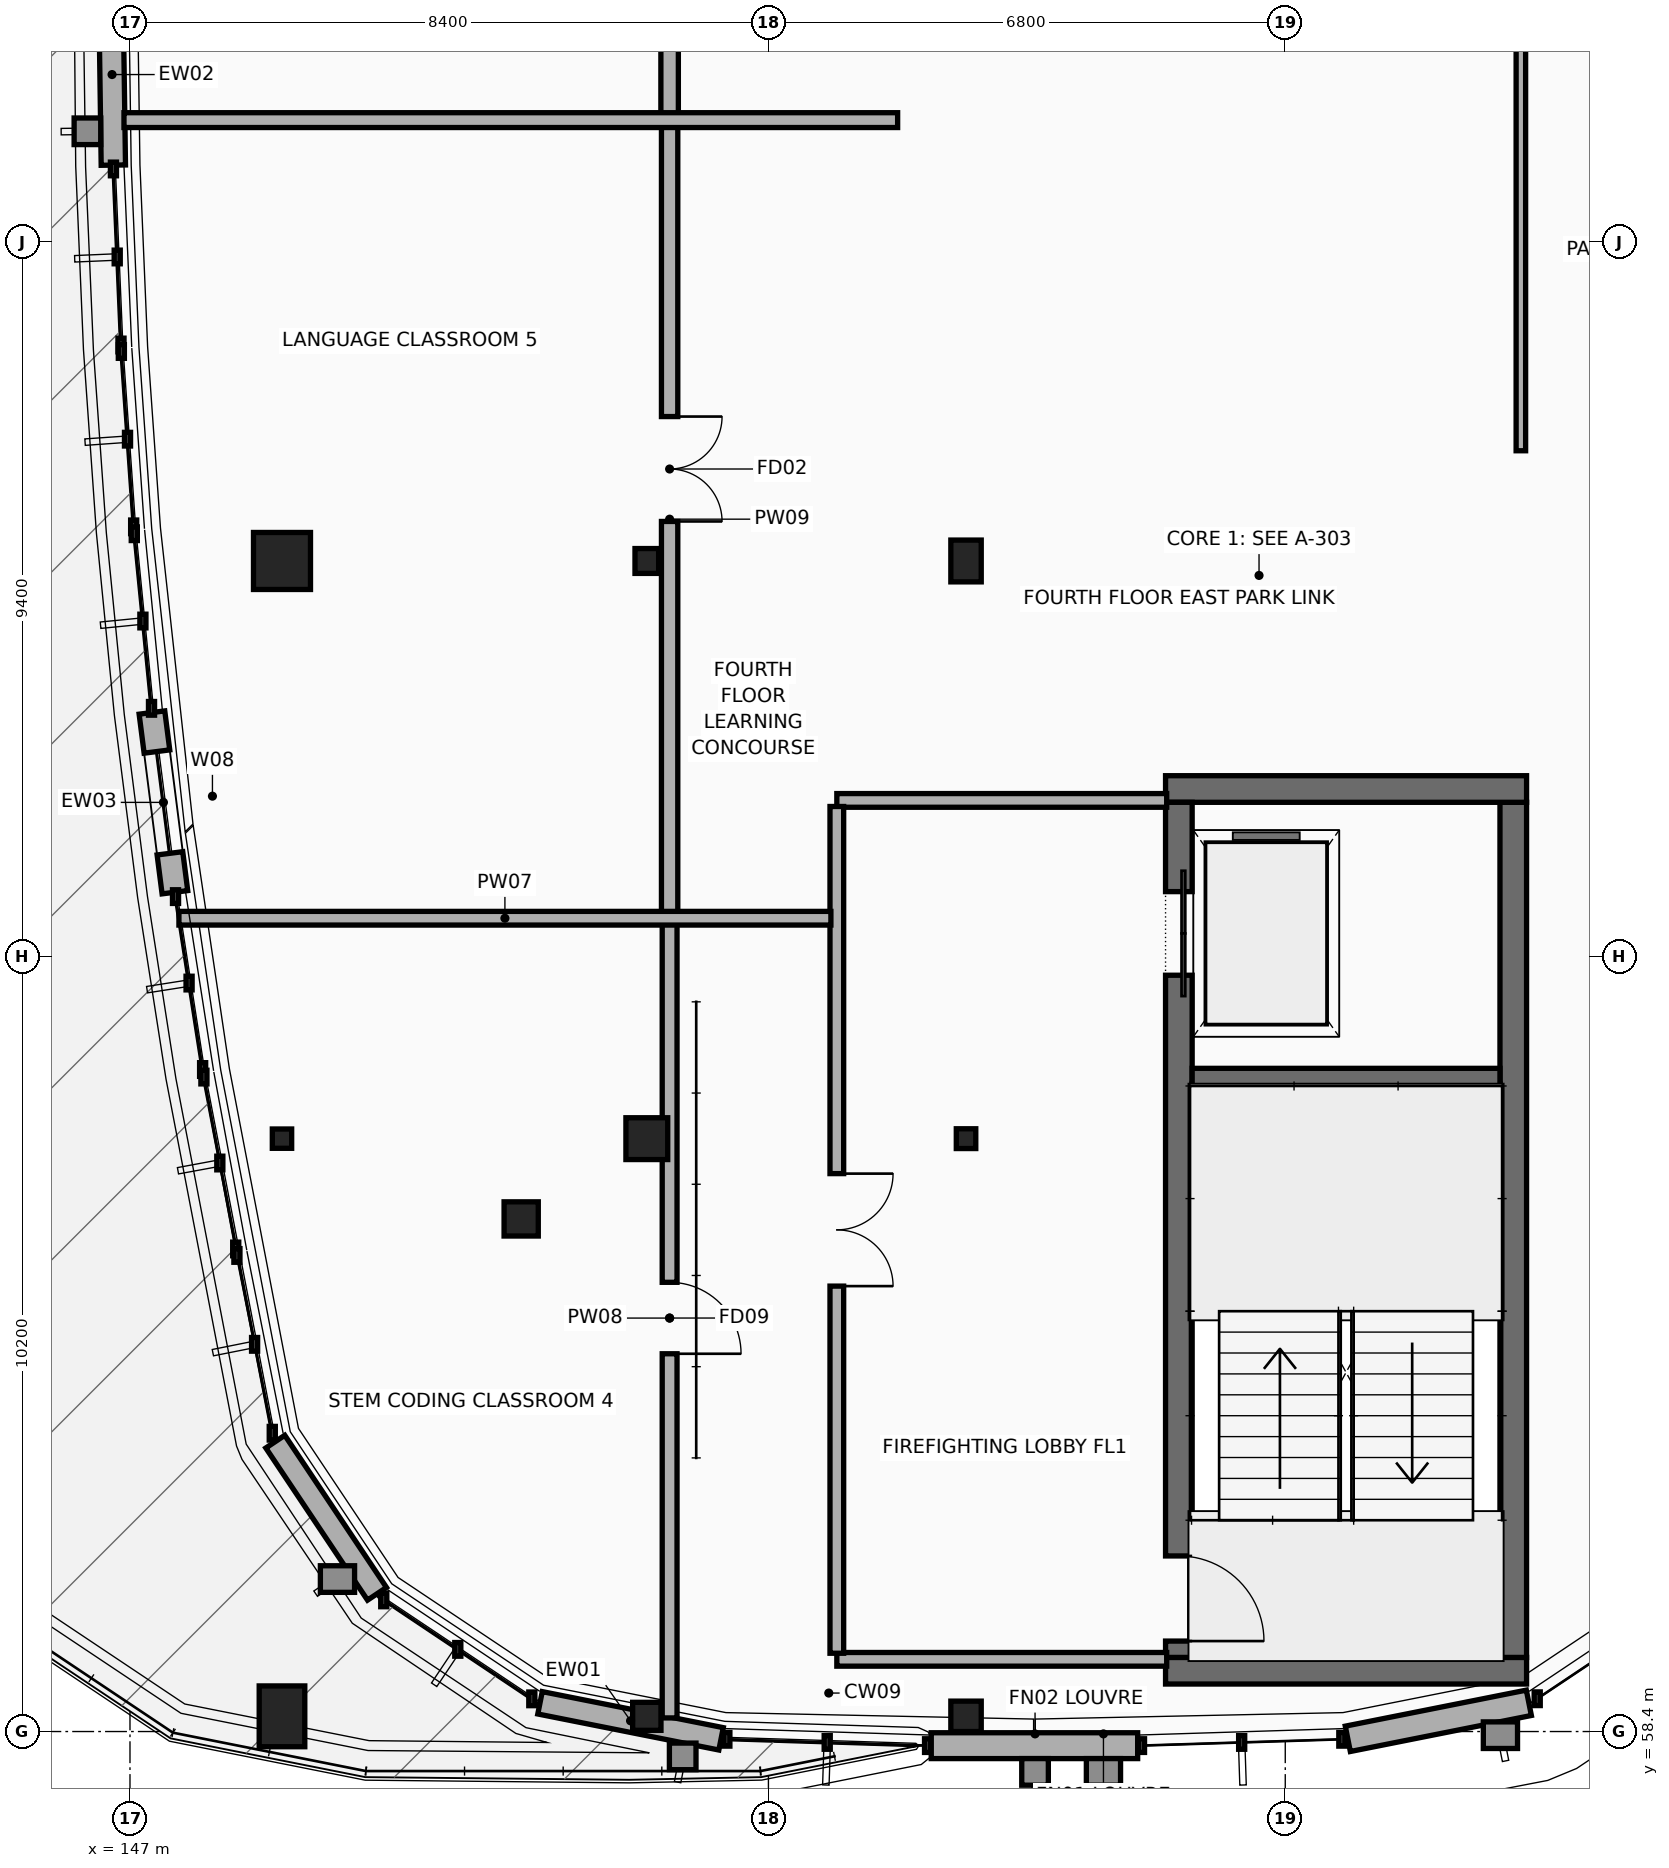
"""IFC4 building model, lengths in metres.
Left out: names, types, materials, properties, quantities, classifications, styles, units other than length and angle.
Written with IfcOpenShell. Run it as: python <this file> out.ifc"""

import sys

from ifc_helpers import new_model, si_unit, direction, frame, frame_2d, origin, origin_2d, place, context, subcontext, project, spatial, rectangle, i_section, extrude, element, fill, save


model = new_model("IFC4")
c1 = context("Model", 3, precision=1e-05, world=origin(), true_north=direction((0.0, 1.0)))
c2 = subcontext(c1, "Body", "Model", "MODEL_VIEW")
j1 = project(units=[si_unit("LENGTHUNIT", "METRE"), si_unit("PLANEANGLEUNIT", "RADIAN")], contexts=[c1])
p1 = place(None, origin())
s1 = spatial("IfcSite", under=j1, at=p1, CompositionType="ELEMENT")
p2 = place(p1, origin())
s2 = spatial("IfcBuilding", under=s1, at=p2, CompositionType="ELEMENT")
p3 = place(p2, frame((0.0, 0.0, 16.2)))
s3 = spatial("IfcBuildingStorey", under=s2, at=p3, CompositionType="ELEMENT", Elevation=16.2)
p4 = place(p3, frame((160.625, 59.2, 0.0), z_axis=(0.0, 0.0, 1.0), x_axis=(1.0, 0.0, 0.0)))
e1 = element("IfcWall", 1, at=p4, inside=s3, PredefinedType="SHEAR", context=c2, shape_type="SweptSolid", body=[
    extrude(rectangle(XDim=4.75, YDim=0.35, at=frame_2d((2.375, 0.0))), origin(), (0.0, 0.0, 1.0), 3.6),
])
p5 = place(p3, frame((165.2, 59.375, 0.0), z_axis=(0.0, 0.0, 1.0), x_axis=(0.0, 1.0, 0.0)))
e2 = element("IfcWall", 2, at=p5, inside=s3, PredefinedType="SHEAR", context=c2, shape_type="SweptSolid", body=[
    extrude(rectangle(XDim=11.25, YDim=0.35, at=frame_2d((5.625, 0.0))), origin(), (0.0, 0.0, 1.0), 3.6),
])
p6 = place(p3, frame((165.375, 70.8, 0.0), z_axis=(0.0, 0.0, 1.0), x_axis=(-1.0, 0.0, 0.0)))
e3 = element("IfcWall", 3, at=p6, inside=s3, PredefinedType="SHEAR", context=c2, shape_type="SweptSolid", body=[
    extrude(rectangle(XDim=4.75, YDim=0.35, at=frame_2d((2.375, 0.0))), origin(), (0.0, 0.0, 1.0), 3.6),
])
p7 = place(p3, frame((160.8, 70.625, 0.0), z_axis=(0.0, 0.0, 1.0), x_axis=(0.0, -1.0, 0.0)))
e4 = element("IfcWall", 4, at=p7, inside=s3, PredefinedType="SHEAR", context=c2, shape_type="SweptSolid", body=[
    extrude(rectangle(XDim=11.25, YDim=0.35, at=frame_2d((5.625, 0.0))), origin(), (0.0, 0.0, 1.0), 3.6),
])
p8 = place(p7, frame((1.175, 0.0, 0.0)))
e5 = element("IfcOpeningElement", 5, at=p8, cuts=e4, PredefinedType="OPENING", context=c2, shape_type="SweptSolid", body=[
    extrude(rectangle(XDim=1.1, YDim=2.2, at=frame_2d((0.55, 1.1))), frame((0.0, 0.185, 0.0), z_axis=(0.0, -1.0, 0.0), x_axis=(1.0, 0.0, 0.0)), (0.0, 0.0, 1.0), 0.37),
])
p9 = place(p7, frame((9.915, 0.0, 0.0)))
e6 = element("IfcOpeningElement", 6, at=p9, cuts=e4, PredefinedType="OPENING", context=c2, shape_type="SweptSolid", body=[
    extrude(rectangle(XDim=1.12, YDim=2.16, at=frame_2d((0.56, 1.08))), frame((0.0, 0.185, 0.0), z_axis=(0.0, -1.0, 0.0), x_axis=(1.0, 0.0, 0.0)), (0.0, 0.0, 1.0), 0.37),
])
p10 = place(p3, frame((160.975, 67.0, 0.0), z_axis=(0.0, 0.0, 1.0), x_axis=(1.0, 0.0, 0.0)))
e7 = element("IfcWall", 7, at=p10, inside=s3, PredefinedType="SHEAR", context=c2, shape_type="SweptSolid", body=[
    extrude(rectangle(XDim=4.05, YDim=0.25, at=frame_2d((2.025, 0.0))), origin(), (0.0, 0.0, 1.0), 3.6),
])
p11 = place(p3, frame((149.0, 58.6, 0.0), z_axis=(0.0, 0.0, 1.0), x_axis=(1.0, 0.0, 0.0)))
e8 = element("IfcColumn", 8, at=p11, inside=s3, PredefinedType="COLUMN", context=c2, shape_type="SweptSolid", body=[
    extrude(rectangle(XDim=0.6, YDim=0.8, at=origin_2d()), origin(), (0.0, 0.0, 1.0), 3.6),
])
p12 = place(p3, frame((149.0, 66.2, 0.0), z_axis=(0.0, 0.0, 1.0), x_axis=(1.0, 0.0, 0.0)))
e9 = element("IfcColumn", 9, at=p12, inside=s3, PredefinedType="COLUMN", context=c2, shape_type="SweptSolid", body=[
    extrude(i_section(OverallWidth=0.255, OverallDepth=0.254, WebThickness=0.009, FlangeThickness=0.014, at=origin_2d()), origin(), (0.0, 0.0, 1.0), 3.6),
])
p13 = place(p3, frame((149.0, 73.8, 0.0), z_axis=(0.0, 0.0, 1.0), x_axis=(1.0, 0.0, 0.0)))
e10 = element("IfcColumn", 10, at=p13, inside=s3, PredefinedType="COLUMN", context=c2, shape_type="SweptSolid", body=[
    extrude(rectangle(XDim=0.75, YDim=0.75, at=origin_2d()), origin(), (0.0, 0.0, 1.0), 3.6),
])
p14 = place(p3, frame((153.8, 58.6, 0.0), z_axis=(0.0, 0.0, 1.0), x_axis=(1.0, 0.0, 0.0)))
e11 = element("IfcColumn", 11, at=p14, inside=s3, PredefinedType="COLUMN", context=c2, shape_type="SweptSolid", body=[
    extrude(i_section(OverallWidth=0.373, OverallDepth=0.368, WebThickness=0.014, FlangeThickness=0.024, at=origin_2d()), origin(), (0.0, 0.0, 1.0), 3.6),
])
p15 = place(p3, frame((153.8, 66.2, 0.0), z_axis=(0.0, 0.0, 1.0), x_axis=(1.0, 0.0, 0.0)))
e12 = element("IfcColumn", 12, at=p15, inside=s3, PredefinedType="COLUMN", context=c2, shape_type="SweptSolid", body=[
    extrude(rectangle(XDim=0.55, YDim=0.55, at=origin_2d()), origin(), (0.0, 0.0, 1.0), 3.6),
])
p16 = place(p3, frame((153.8, 73.8, 0.0), z_axis=(0.0, 0.0, 1.0), x_axis=(1.0, 0.0, 0.0)))
e13 = element("IfcColumn", 13, at=p16, inside=s3, PredefinedType="COLUMN", context=c2, shape_type="SweptSolid", body=[
    extrude(i_section(OverallWidth=0.311, OverallDepth=0.327, WebThickness=0.016, FlangeThickness=0.025, at=origin_2d()), origin(), (0.0, 0.0, 1.0), 3.6),
])
p17 = place(p3, frame((158.0, 58.6, 0.0), z_axis=(0.0, 0.0, 1.0), x_axis=(1.0, 0.0, 0.0)))
e14 = element("IfcColumn", 14, at=p17, inside=s3, PredefinedType="COLUMN", context=c2, shape_type="SweptSolid", body=[
    extrude(rectangle(XDim=0.4, YDim=0.4, at=origin_2d()), origin(), (0.0, 0.0, 1.0), 3.6),
])
p18 = place(p3, frame((158.0, 66.2, 0.0), z_axis=(0.0, 0.0, 1.0), x_axis=(1.0, 0.0, 0.0)))
e15 = element("IfcColumn", 15, at=p18, inside=s3, PredefinedType="COLUMN", context=c2, shape_type="SweptSolid", body=[
    extrude(i_section(OverallWidth=0.256, OverallDepth=0.26, WebThickness=0.01, FlangeThickness=0.017, at=origin_2d()), origin(), (0.0, 0.0, 1.0), 3.6),
])
p19 = place(p3, frame((158.0, 73.8, 0.0), z_axis=(0.0, 0.0, 1.0), x_axis=(1.0, 0.0, 0.0)))
e16 = element("IfcColumn", 16, at=p19, inside=s3, PredefinedType="COLUMN", context=c2, shape_type="SweptSolid", body=[
    extrude(rectangle(XDim=0.4, YDim=0.55, at=origin_2d()), origin(), (0.0, 0.0, 1.0), 3.6),
])
p20 = place(p3, frame((152.147, 65.144, 0.0), z_axis=(0.0, 0.0, 1.0), x_axis=(1.0, 0.0, 0.0)))
e17 = element("IfcColumn", 17, at=p20, inside=s3, PredefinedType="COLUMN", context=c2, shape_type="SweptSolid", body=[
    extrude(rectangle(XDim=0.45, YDim=0.45, at=origin_2d()), origin(), (0.0, 0.0, 1.0), 3.353),
])
p21 = place(p3, frame((160.258, 58.214, 0.0), z_axis=(0.0, 0.0, 1.0), x_axis=(-1.0, 0.0, 0.0)))
e18 = element("IfcWall", 18, at=p21, inside=s3, PredefinedType="STANDARD", context=c2, shape_type="SweptSolid", body=[
    extrude(rectangle(XDim=2.716, YDim=0.34, at=frame_2d((1.358, 0.0))), origin(), (0.0, 0.0, 1.0), 3.337),
])
p22 = place(p3, frame((165.405, 58.778, 0.0), z_axis=(0.0, 0.0, 1.0), x_axis=(-0.980761961866, -0.195207515624, 0.0)))
e19 = element("IfcWall", 19, at=p22, inside=s3, PredefinedType="STANDARD", context=c2, shape_type="SweptSolid", body=[
    extrude(rectangle(XDim=2.429, YDim=0.34, at=frame_2d((1.214, 0.0))), origin(), (0.0, 0.0, 1.0), 3.372),
])
p23 = place(p3, frame((146.781, 79.008, 0.0), z_axis=(0.0, 0.0, 1.0), x_axis=(-0.014238900565, 0.999898621717, 0.0)))
e20 = element("IfcWall", 20, at=p23, inside=s3, PredefinedType="STANDARD", context=c2, shape_type="SweptSolid", body=[
    extrude(rectangle(XDim=2.383, YDim=0.32, at=frame_2d((1.192, 0.0))), origin(), (0.0, 0.0, 1.0), 3.337),
])
p24 = place(p3, frame((147.591, 69.442, 0.0), z_axis=(0.0, 0.0, 1.0), x_axis=(-0.126719816895, 0.991938550519, 0.0)))
e21 = element("IfcWall", 21, at=p24, inside=s3, PredefinedType="STANDARD", context=c2, shape_type="SweptSolid", body=[
    extrude(rectangle(XDim=2.383, YDim=0.34, at=frame_2d((1.192, 0.0))), origin(), (0.0, 0.0, 1.0), 3.337),
])
p25 = place(p24, frame((0.516, 0.0, 0.9)))
e22 = element("IfcOpeningElement", 22, at=p25, cuts=e21, PredefinedType="OPENING", context=c2, shape_type="SweptSolid", body=[
    extrude(rectangle(XDim=1.35, YDim=1.65, at=frame_2d((0.675, 0.825))), frame((0.0, 0.18, 0.0), z_axis=(0.0, -1.0, 0.0), x_axis=(1.0, 0.0, 0.0)), (0.0, 0.0, 1.0), 0.36),
])
p26 = place(p3, frame((150.25, 60.212, 0.0), z_axis=(0.0, 0.0, 1.0), x_axis=(-0.555588946657, 0.831457107945, 0.0)))
e23 = element("IfcWall", 23, at=p26, inside=s3, PredefinedType="STANDARD", context=c2, shape_type="SweptSolid", body=[
    extrude(rectangle(XDim=2.408, YDim=0.3, at=frame_2d((1.204, 0.0))), origin(), (0.0, 0.0, 1.0), 2.916),
])
p27 = place(p3, frame((154.777, 58.304, 0.0), z_axis=(0.0, 0.0, 1.0), x_axis=(-0.980761961866, 0.195207515624, 0.0)))
e24 = element("IfcWall", 24, at=p27, inside=s3, PredefinedType="STANDARD", context=c2, shape_type="SweptSolid", body=[
    extrude(rectangle(XDim=2.429, YDim=0.3, at=frame_2d((1.214, 0.0))), origin(), (0.0, 0.0, 1.0), 2.605),
])
p28 = place(p3, frame((156.3, 59.35, 0.0), z_axis=(0.0, 0.0, 1.0), x_axis=(1.0, 0.0, 0.0)))
e25 = element("IfcWall", 25, at=p28, inside=s3, PredefinedType="PARTITIONING", context=c2, shape_type="SweptSolid", body=[
    extrude(rectangle(XDim=4.34, YDim=0.18, at=frame_2d((2.17, 0.0))), origin(), (0.0, 0.0, 1.0), 2.637),
])
p29 = place(p3, frame((160.64, 70.65, 0.0), z_axis=(0.0, 0.0, 1.0), x_axis=(-1.0, 0.0, 0.0)))
e26 = element("IfcWall", 26, at=p29, inside=s3, PredefinedType="PARTITIONING", context=c2, shape_type="SweptSolid", body=[
    extrude(rectangle(XDim=4.34, YDim=0.18, at=frame_2d((2.17, 0.0))), origin(), (0.0, 0.0, 1.0), 2.598),
])
p30 = place(p3, frame((156.3, 70.57, 0.0), z_axis=(0.0, 0.0, 1.0), x_axis=(0.0, -1.0, 0.0)))
e27 = element("IfcWall", 27, at=p30, inside=s3, PredefinedType="PARTITIONING", context=c2, shape_type="SweptSolid", body=[
    extrude(rectangle(XDim=11.14, YDim=0.18, at=frame_2d((5.57, 0.0))), origin(), (0.0, 0.0, 1.0), 2.951),
])
p31 = place(p30, frame((4.83, 0.0, 0.0)))
e28 = element("IfcOpeningElement", 28, at=p31, cuts=e27, PredefinedType="OPENING", context=c2, shape_type="SweptSolid", body=[
    extrude(rectangle(XDim=1.48, YDim=2.22, at=frame_2d((0.74, 1.11))), frame((0.0, 0.1, 0.0), z_axis=(0.0, -1.0, 0.0), x_axis=(1.0, 0.0, 0.0)), (0.0, 0.0, 1.0), 0.2),
])
p32 = place(p3, frame((154.1, 69.1, 0.0), z_axis=(0.0, 0.0, 1.0), x_axis=(0.0, -1.0, 0.0)))
e29 = element("IfcWall", 29, at=p32, inside=s3, PredefinedType="PARTITIONING", context=c2, shape_type="SweptSolid", body=[
    extrude(rectangle(XDim=10.521, YDim=0.195, at=frame_2d((5.26, 0.0))), origin(), (0.0, 0.0, 1.0), 2.605),
])
p33 = place(p32, frame((4.79, 0.0, 0.0)))
e30 = element("IfcOpeningElement", 30, at=p33, cuts=e29, PredefinedType="OPENING", context=c2, shape_type="SweptSolid", body=[
    extrude(rectangle(XDim=0.94, YDim=2.1, at=frame_2d((0.47, 1.05))), frame((0.0, 0.107, 0.0), z_axis=(0.0, -1.0, 0.0), x_axis=(1.0, 0.0, 0.0)), (0.0, 0.0, 1.0), 0.215),
])
p34 = place(p3, frame((154.1, 79.6, 0.0), z_axis=(0.0, 0.0, 1.0), x_axis=(0.0, -1.0, 0.0)))
e31 = element("IfcWall", 31, at=p34, inside=s3, PredefinedType="PARTITIONING", context=c2, shape_type="SweptSolid", body=[
    extrude(rectangle(XDim=10.5, YDim=0.215, at=frame_2d((5.25, 0.0))), origin(), (0.0, 0.0, 1.0), 2.46),
])
p35 = place(p34, frame((3.9, 0.0, 0.0)))
e32 = element("IfcOpeningElement", 32, at=p35, cuts=e31, PredefinedType="OPENING", context=c2, shape_type="SweptSolid", body=[
    extrude(rectangle(XDim=1.38, YDim=2.2, at=frame_2d((0.69, 1.1))), frame((0.0, 0.117, 0.0), z_axis=(0.0, -1.0, 0.0), x_axis=(1.0, 0.0, 0.0)), (0.0, 0.0, 1.0), 0.235),
])
p36 = place(p3, frame((154.1, 89.5, 0.0), z_axis=(0.0, 0.0, 1.0), x_axis=(0.0, -1.0, 0.0)))
e33 = element("IfcWall", 33, at=p36, inside=s3, PredefinedType="PARTITIONING", context=c2, shape_type="SweptSolid", body=[
    extrude(rectangle(XDim=9.9, YDim=0.23, at=frame_2d((4.95, 0.0))), origin(), (0.0, 0.0, 1.0), 2.752),
])
p37 = place(p36, frame((4.21, 0.0, 0.0)))
e34 = element("IfcOpeningElement", 34, at=p37, cuts=e33, PredefinedType="OPENING", context=c2, shape_type="SweptSolid", body=[
    extrude(rectangle(XDim=1.48, YDim=2.22, at=frame_2d((0.74, 1.11))), frame((0.0, 0.125, 0.0), z_axis=(0.0, -1.0, 0.0), x_axis=(1.0, 0.0, 0.0)), (0.0, 0.0, 1.0), 0.25),
])
p38 = place(p3, frame((165.3, 75.25, 0.0), z_axis=(0.0, 0.0, 1.0), x_axis=(0.0, 1.0, 0.0)))
e35 = element("IfcWall", 35, at=p38, inside=s3, PredefinedType="PARTITIONING", context=c2, shape_type="SweptSolid", body=[
    extrude(rectangle(XDim=16.787, YDim=0.125, at=frame_2d((8.394, 0.0))), origin(), (0.0, 0.0, 1.0), 2.71),
])
p39 = place(p38, frame((7.884, 0.0, 0.0)))
e36 = element("IfcOpeningElement", 36, at=p39, cuts=e35, PredefinedType="OPENING", context=c2, shape_type="SweptSolid", body=[
    extrude(rectangle(XDim=1.02, YDim=2.14, at=frame_2d((0.51, 1.07))), frame((0.0, 0.073, 0.0), z_axis=(0.0, -1.0, 0.0), x_axis=(1.0, 0.0, 0.0)), (0.0, 0.0, 1.0), 0.145),
])
p40 = place(p3, frame((147.644, 69.1, 0.0), z_axis=(0.0, 0.0, 1.0), x_axis=(1.0, 0.0, 0.0)))
e37 = element("IfcWall", 37, at=p40, inside=s3, PredefinedType="PARTITIONING", context=c2, shape_type="SweptSolid", body=[
    extrude(rectangle(XDim=8.578, YDim=0.18, at=frame_2d((4.289, 0.0))), origin(), (0.0, 0.0, 1.0), 2.823),
])
p41 = place(p3, frame((146.921, 79.6, 0.0), z_axis=(0.0, 0.0, 1.0), x_axis=(1.0, 0.0, 0.0)))
e38 = element("IfcWall", 38, at=p41, inside=s3, PredefinedType="PARTITIONING", context=c2, shape_type="SweptSolid", body=[
    extrude(rectangle(XDim=10.179, YDim=0.195, at=frame_2d((5.09, 0.0))), origin(), (0.0, 0.0, 1.0), 2.821),
])
p42 = place(p25, origin())
e39 = element("IfcWindow", 39, at=p42, inside=s3, PartitioningType="SINGLE_PANEL", PredefinedType="WINDOW", context=c2, shape_type="SweptSolid", body=[
    extrude(rectangle(XDim=1.35, YDim=1.65, at=frame_2d((0.675, 0.825))), frame((0.0, 0.03, 0.0), z_axis=(0.0, -1.0, 0.0), x_axis=(1.0, 0.0, 0.0)), (0.0, 0.0, 1.0), 0.06),
])
fill(e22, e39)
p43 = place(p8, origin())
e40 = element("IfcDoor", 40, at=p43, inside=s3, OperationType="DOUBLE_DOOR_SLIDING", PredefinedType="DOOR", context=c2, shape_type="SweptSolid", body=[
    extrude(rectangle(XDim=1.1, YDim=2.2, at=frame_2d((0.55, 1.1))), frame((0.0, 0.025, 0.0), z_axis=(0.0, -1.0, 0.0), x_axis=(1.0, 0.0, 0.0)), (0.0, 0.0, 1.0), 0.05),
])
fill(e5, e40)
p44 = place(p9, origin())
e41 = element("IfcDoor", 41, at=p44, inside=s3, OperationType="SINGLE_SWING_RIGHT", PredefinedType="DOOR", context=c2, shape_type="SweptSolid", body=[
    extrude(rectangle(XDim=1.12, YDim=2.16, at=frame_2d((0.56, 1.08))), frame((0.0, 0.025, 0.0), z_axis=(0.0, -1.0, 0.0), x_axis=(1.0, 0.0, 0.0)), (0.0, 0.0, 1.0), 0.05),
])
fill(e6, e41)
p45 = place(p31, origin())
e42 = element("IfcDoor", 42, at=p45, inside=s3, OperationType="DOUBLE_DOOR_SINGLE_SWING", PredefinedType="DOOR", context=c2, shape_type="SweptSolid", body=[
    extrude(rectangle(XDim=1.48, YDim=2.22, at=frame_2d((0.74, 1.11))), frame((0.0, 0.025, 0.0), z_axis=(0.0, -1.0, 0.0), x_axis=(1.0, 0.0, 0.0)), (0.0, 0.0, 1.0), 0.05),
])
fill(e28, e42)
p46 = place(p33, origin())
e43 = element("IfcDoor", 43, at=p46, inside=s3, OperationType="SINGLE_SWING_RIGHT", PredefinedType="DOOR", context=c2, shape_type="SweptSolid", body=[
    extrude(rectangle(XDim=0.94, YDim=2.1, at=frame_2d((0.47, 1.05))), frame((0.0, 0.025, 0.0), z_axis=(0.0, -1.0, 0.0), x_axis=(1.0, 0.0, 0.0)), (0.0, 0.0, 1.0), 0.05),
])
fill(e30, e43)
p47 = place(p35, origin())
e44 = element("IfcDoor", 44, at=p47, inside=s3, OperationType="DOUBLE_DOOR_SINGLE_SWING", PredefinedType="DOOR", context=c2, shape_type="SweptSolid", body=[
    extrude(rectangle(XDim=1.38, YDim=2.2, at=frame_2d((0.69, 1.1))), frame((0.0, 0.025, 0.0), z_axis=(0.0, -1.0, 0.0), x_axis=(1.0, 0.0, 0.0)), (0.0, 0.0, 1.0), 0.05),
])
fill(e32, e44)
save(model, sys.argv[1])
